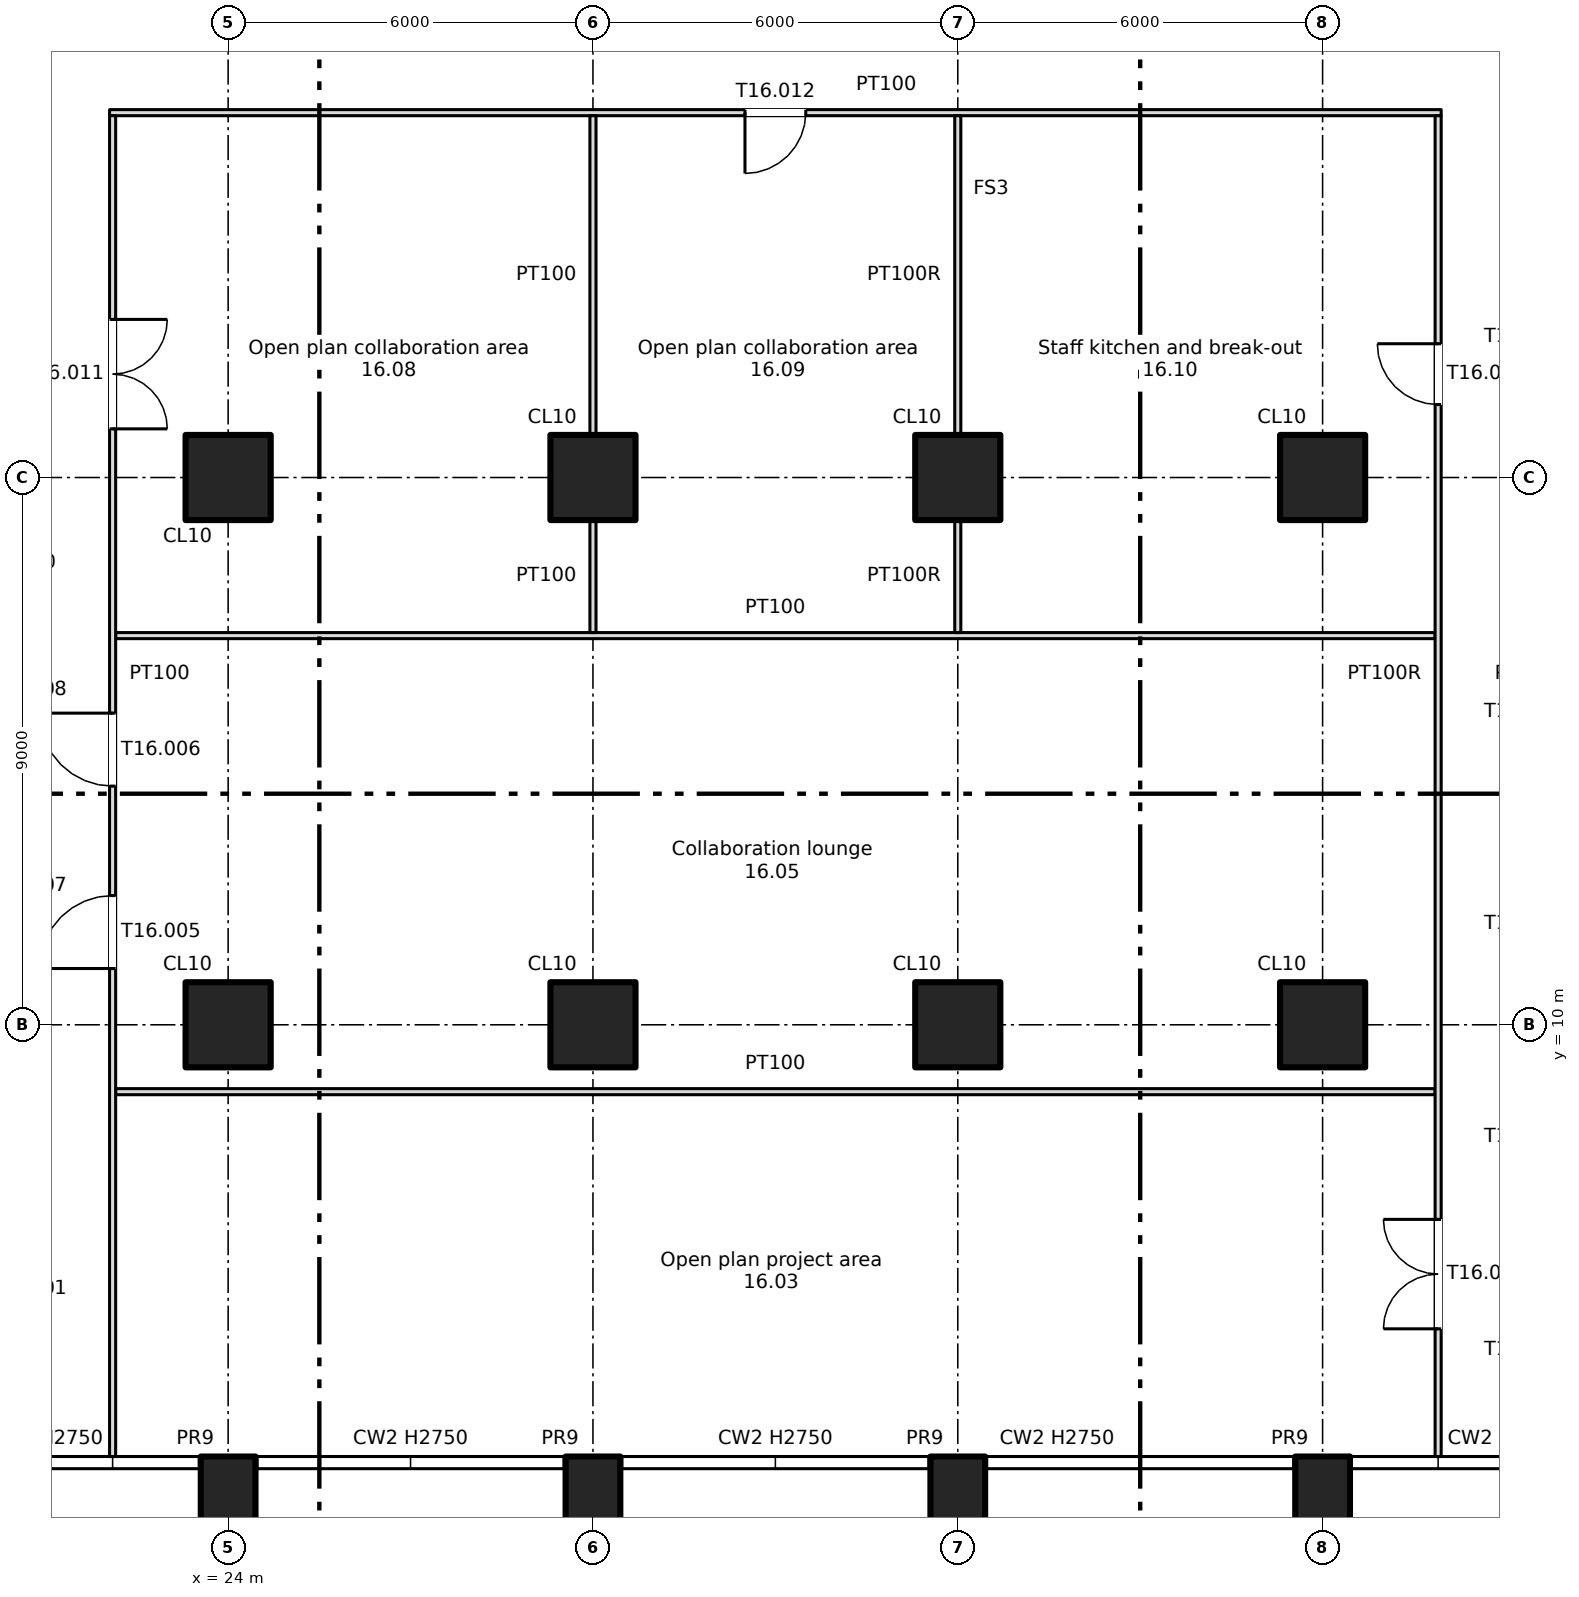
"""IFC4 building model, lengths in metres.
Left out: names, types, materials, properties, quantities, classifications, styles, units other than length and angle.
Written with IfcOpenShell. Run it as: python <this file> out.ifc"""

import sys

from ifc_helpers import new_model, si_unit, direction, frame, frame_2d, origin, origin_2d, place, context, subcontext, project, spatial, rectangle, extrude, element, fill, save


model = new_model("IFC4")
c1 = context("Model", 3, precision=1e-05, world=origin(), true_north=direction((0.0, 1.0)))
c2 = subcontext(c1, "Body", "Model", "MODEL_VIEW")
j1 = project(units=[si_unit("LENGTHUNIT", "METRE"), si_unit("PLANEANGLEUNIT", "RADIAN")], contexts=[c1])
p1 = place(None, origin())
s1 = spatial("IfcSite", under=j1, at=p1, CompositionType="ELEMENT")
p2 = place(p1, origin())
s2 = spatial("IfcBuilding", under=s1, at=p2, CompositionType="ELEMENT")
p3 = place(p2, frame((0.0, 0.0, 102.5)))
s3 = spatial("IfcBuildingStorey", under=s2, at=p3, CompositionType="ELEMENT", Elevation=102.5)
for number, where, z_axis, x_axis in (
    (1, (24.0, 2.2, -0.4), (0.0, 0.0, 1.0), (1.0, 0.0, 0.0)),
    (2, (30.0, 2.2, -0.4), (0.0, 0.0, 1.0), (1.0, 0.0, 0.0)),
    (3, (36.0, 2.2, -0.4), (0.0, 0.0, 1.0), (1.0, 0.0, 0.0)),
    (4, (42.0, 2.2, -0.4), (0.0, 0.0, 1.0), (1.0, 0.0, 0.0)),
):
    element("IfcColumn", number, at=place(p3, frame(where, z_axis=z_axis, x_axis=x_axis)), inside=s3, PredefinedType="COLUMN", context=c2, shape_type="SweptSolid", body=[
        extrude(rectangle(XDim=0.9, YDim=1.4, at=origin_2d()), origin(), (0.0, 0.0, 1.0), 3.75),
    ])
for number, where, z_axis, x_axis in (
    (5, (24.0, 10.0, 0.0), (0.0, 0.0, 1.0), (1.0, 0.0, 0.0)),
    (6, (24.0, 19.0, 0.0), (0.0, 0.0, 1.0), (1.0, 0.0, 0.0)),
    (7, (30.0, 10.0, 0.0), (0.0, 0.0, 1.0), (1.0, 0.0, 0.0)),
    (8, (30.0, 19.0, 0.0), (0.0, 0.0, 1.0), (1.0, 0.0, 0.0)),
    (9, (36.0, 10.0, 0.0), (0.0, 0.0, 1.0), (1.0, 0.0, 0.0)),
    (10, (36.0, 19.0, 0.0), (0.0, 0.0, 1.0), (1.0, 0.0, 0.0)),
    (11, (42.0, 10.0, 0.0), (0.0, 0.0, 1.0), (1.0, 0.0, 0.0)),
    (12, (42.0, 19.0, 0.0), (0.0, 0.0, 1.0), (1.0, 0.0, 0.0)),
):
    element("IfcColumn", number, at=place(p3, frame(where, z_axis=z_axis, x_axis=x_axis)), inside=s3, PredefinedType="COLUMN", context=c2, shape_type="SweptSolid", body=[
        extrude(rectangle(XDim=1.4, YDim=1.4, at=origin_2d()), origin(), (0.0, 0.0, 1.0), 3.35),
    ])
for number, where, z_axis, x_axis in (
    (13, (22.15, 8.9, 0.0), (0.0, 0.0, 1.0), (1.0, 0.0, 0.0)),
    (14, (22.15, 16.4, 0.0), (0.0, 0.0, 1.0), (1.0, 0.0, 0.0)),
):
    element("IfcWall", number, at=place(p3, frame(where, z_axis=z_axis, x_axis=x_axis)), inside=s3, PredefinedType="PARTITIONING", context=c2, shape_type="SweptSolid", body=[
        extrude(rectangle(XDim=21.7, YDim=0.1, at=frame_2d((10.85, 0.0))), origin(), (0.0, 0.0, 1.0), 3.35),
    ])
p4 = place(p3, frame((22.05, 25.0, 0.0), z_axis=(0.0, 0.0, 1.0), x_axis=(1.0, 0.0, 0.0)))
e15 = element("IfcWall", 15, at=p4, inside=s3, PredefinedType="PARTITIONING", context=c2, shape_type="SweptSolid", body=[
    extrude(rectangle(XDim=21.9, YDim=0.1, at=frame_2d((10.95, 0.0))), origin(), (0.0, 0.0, 1.0), 3.35),
])
p5 = place(p4, frame((10.45, 0.0, 0.0)))
e16 = element("IfcOpeningElement", 16, at=p5, cuts=e15, PredefinedType="OPENING", context=c2, shape_type="SweptSolid", body=[
    extrude(rectangle(XDim=1.0, YDim=2.1, at=frame_2d((0.5, 1.05))), frame((0.0, 0.06, 0.0), z_axis=(0.0, -1.0, 0.0), x_axis=(1.0, 0.0, 0.0)), (0.0, 0.0, 1.0), 0.12),
])
p6 = place(p3, frame((22.1, 2.9, 0.0), z_axis=(0.0, 0.0, 1.0), x_axis=(0.0, 1.0, 0.0)))
e17 = element("IfcWall", 17, at=p6, inside=s3, PredefinedType="PARTITIONING", context=c2, shape_type="SweptSolid", body=[
    extrude(rectangle(XDim=22.05, YDim=0.1, at=frame_2d((11.025, 0.0))), origin(), (0.0, 0.0, 1.0), 3.35),
])
p7 = place(p6, frame((8.025, 0.0, 0.0)))
e18 = element("IfcOpeningElement", 18, at=p7, cuts=e17, PredefinedType="OPENING", context=c2, shape_type="SweptSolid", body=[
    extrude(rectangle(XDim=1.2, YDim=2.1, at=frame_2d((0.6, 1.05))), frame((0.0, 0.06, 0.0), z_axis=(0.0, -1.0, 0.0), x_axis=(1.0, 0.0, 0.0)), (0.0, 0.0, 1.0), 0.12),
])
p8 = place(p6, frame((11.025, 0.0, 0.0)))
e19 = element("IfcOpeningElement", 19, at=p8, cuts=e17, PredefinedType="OPENING", context=c2, shape_type="SweptSolid", body=[
    extrude(rectangle(XDim=1.2, YDim=2.1, at=frame_2d((0.6, 1.05))), frame((0.0, 0.06, 0.0), z_axis=(0.0, -1.0, 0.0), x_axis=(1.0, 0.0, 0.0)), (0.0, 0.0, 1.0), 0.12),
])
p9 = place(p6, frame((16.9, 0.0, 0.0)))
e20 = element("IfcOpeningElement", 20, at=p9, cuts=e17, PredefinedType="OPENING", context=c2, shape_type="SweptSolid", body=[
    extrude(rectangle(XDim=1.8, YDim=2.1, at=frame_2d((0.9, 1.05))), frame((0.0, 0.06, 0.0), z_axis=(0.0, -1.0, 0.0), x_axis=(1.0, 0.0, 0.0)), (0.0, 0.0, 1.0), 0.12),
])
p10 = place(p3, frame((30.0, 16.45, 0.0), z_axis=(0.0, 0.0, 1.0), x_axis=(0.0, 1.0, 0.0)))
e21 = element("IfcWall", 21, at=p10, inside=s3, PredefinedType="PARTITIONING", context=c2, shape_type="SweptSolid", body=[
    extrude(rectangle(XDim=1.85, YDim=0.1, at=frame_2d((0.925, 0.0))), origin(), (0.0, 0.0, 1.0), 3.35),
])
p11 = place(p3, frame((30.0, 19.7, 0.0), z_axis=(0.0, 0.0, 1.0), x_axis=(0.0, 1.0, 0.0)))
e22 = element("IfcWall", 22, at=p11, inside=s3, PredefinedType="PARTITIONING", context=c2, shape_type="SweptSolid", body=[
    extrude(rectangle(XDim=5.25, YDim=0.1, at=frame_2d((2.625, 0.0))), origin(), (0.0, 0.0, 1.0), 3.35),
])
p12 = place(p3, frame((36.0, 16.45, 0.0), z_axis=(0.0, 0.0, 1.0), x_axis=(0.0, 1.0, 0.0)))
e23 = element("IfcWall", 23, at=p12, inside=s3, PredefinedType="PARTITIONING", context=c2, shape_type="SweptSolid", body=[
    extrude(rectangle(XDim=1.85, YDim=0.1, at=frame_2d((0.925, 0.0))), origin(), (0.0, 0.0, 1.0), 3.35),
])
p13 = place(p3, frame((36.0, 19.7, 0.0), z_axis=(0.0, 0.0, 1.0), x_axis=(0.0, 1.0, 0.0)))
e24 = element("IfcWall", 24, at=p13, inside=s3, PredefinedType="PARTITIONING", context=c2, shape_type="SweptSolid", body=[
    extrude(rectangle(XDim=5.25, YDim=0.1, at=frame_2d((2.625, 0.0))), origin(), (0.0, 0.0, 1.0), 3.35),
])
p14 = place(p3, frame((43.9, 2.9, 0.0), z_axis=(0.0, 0.0, 1.0), x_axis=(0.0, 1.0, 0.0)))
e25 = element("IfcWall", 25, at=p14, inside=s3, PredefinedType="PARTITIONING", context=c2, shape_type="SweptSolid", body=[
    extrude(rectangle(XDim=22.05, YDim=0.1, at=frame_2d((11.025, 0.0))), origin(), (0.0, 0.0, 1.0), 3.35),
])
p15 = place(p14, frame((2.1, 0.0, 0.0)))
e26 = element("IfcOpeningElement", 26, at=p15, cuts=e25, PredefinedType="OPENING", context=c2, shape_type="SweptSolid", body=[
    extrude(rectangle(XDim=1.8, YDim=2.1, at=frame_2d((0.9, 1.05))), frame((0.0, 0.06, 0.0), z_axis=(0.0, -1.0, 0.0), x_axis=(1.0, 0.0, 0.0)), (0.0, 0.0, 1.0), 0.12),
])
p16 = place(p14, frame((17.3, 0.0, 0.0)))
e27 = element("IfcOpeningElement", 27, at=p16, cuts=e25, PredefinedType="OPENING", context=c2, shape_type="SweptSolid", body=[
    extrude(rectangle(XDim=1.0, YDim=2.1, at=frame_2d((0.5, 1.05))), frame((0.0, 0.06, 0.0), z_axis=(0.0, -1.0, 0.0), x_axis=(1.0, 0.0, 0.0)), (0.0, 0.0, 1.0), 0.12),
])
p17 = place(p15, origin())
e28 = element("IfcDoor", 28, at=p17, inside=s3, OperationType="DOUBLE_DOOR_SINGLE_SWING", PredefinedType="DOOR", context=c2, shape_type="SweptSolid", body=[
    extrude(rectangle(XDim=1.8, YDim=2.1, at=frame_2d((0.9, 1.05))), frame((0.0, 0.025, 0.0), z_axis=(0.0, -1.0, 0.0), x_axis=(1.0, 0.0, 0.0)), (0.0, 0.0, 1.0), 0.05),
])
fill(e26, e28)
p18 = place(p7, origin())
e29 = element("IfcDoor", 29, at=p18, inside=s3, OperationType="SINGLE_SWING_LEFT", PredefinedType="DOOR", context=c2, shape_type="SweptSolid", body=[
    extrude(rectangle(XDim=1.2, YDim=2.1, at=frame_2d((0.6, 1.05))), frame((0.0, 0.025, 0.0), z_axis=(0.0, -1.0, 0.0), x_axis=(1.0, 0.0, 0.0)), (0.0, 0.0, 1.0), 0.05),
])
fill(e18, e29)
p19 = place(p8, origin())
e30 = element("IfcDoor", 30, at=p19, inside=s3, OperationType="SINGLE_SWING_RIGHT", PredefinedType="DOOR", context=c2, shape_type="SweptSolid", body=[
    extrude(rectangle(XDim=1.2, YDim=2.1, at=frame_2d((0.6, 1.05))), frame((0.0, 0.025, 0.0), z_axis=(0.0, -1.0, 0.0), x_axis=(1.0, 0.0, 0.0)), (0.0, 0.0, 1.0), 0.05),
])
fill(e19, e30)
p20 = place(p9, origin())
e31 = element("IfcDoor", 31, at=p20, inside=s3, OperationType="DOUBLE_DOOR_SINGLE_SWING", PredefinedType="DOOR", context=c2, shape_type="SweptSolid", body=[
    extrude(rectangle(XDim=1.8, YDim=2.1, at=frame_2d((0.9, 1.05))), frame((0.0, 0.025, 0.0), z_axis=(0.0, -1.0, 0.0), x_axis=(1.0, 0.0, 0.0)), (0.0, 0.0, 1.0), 0.05),
])
fill(e20, e31)
p21 = place(p5, origin())
e32 = element("IfcDoor", 32, at=p21, inside=s3, OperationType="SINGLE_SWING_LEFT", PredefinedType="DOOR", context=c2, shape_type="SweptSolid", body=[
    extrude(rectangle(XDim=1.0, YDim=2.1, at=frame_2d((0.5, 1.05))), frame((0.0, 0.025, 0.0), z_axis=(0.0, -1.0, 0.0), x_axis=(1.0, 0.0, 0.0)), (0.0, 0.0, 1.0), 0.05),
])
fill(e16, e32)
p22 = place(p16, origin())
e33 = element("IfcDoor", 33, at=p22, inside=s3, OperationType="SINGLE_SWING_RIGHT", PredefinedType="DOOR", context=c2, shape_type="SweptSolid", body=[
    extrude(rectangle(XDim=1.0, YDim=2.1, at=frame_2d((0.5, 1.05))), frame((0.0, 0.025, 0.0), z_axis=(0.0, -1.0, 0.0), x_axis=(1.0, 0.0, 0.0)), (0.0, 0.0, 1.0), 0.05),
])
fill(e27, e33)
save(model, sys.argv[1])
